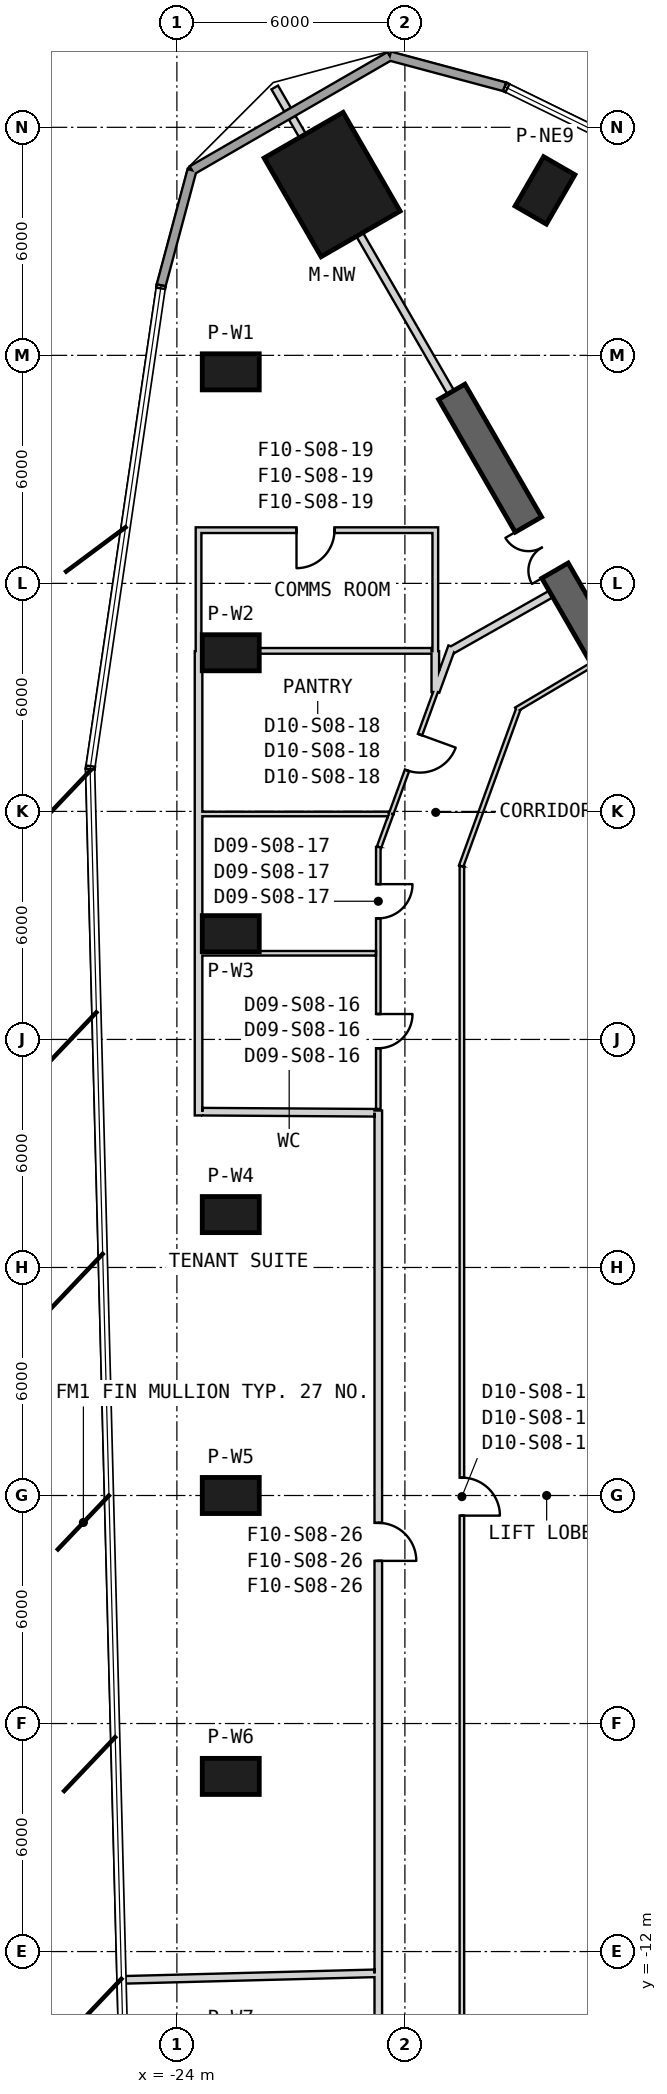
"""IFC4 building model, lengths in metres.
Left out: names, types, materials, properties, quantities, classifications, styles, units other than length and angle.
Written with IfcOpenShell. Run it as: python <this file> out.ifc"""

import sys

from ifc_helpers import new_model, si_unit, direction, frame, frame_2d, origin, origin_2d, place, context, subcontext, project, spatial, rectangle, extrude, element, fill, save


model = new_model("IFC4")
c1 = context("Model", 3, precision=1e-05, world=origin(), true_north=direction((0.0, 1.0)))
c2 = subcontext(c1, "Body", "Model", "MODEL_VIEW")
j1 = project(units=[si_unit("LENGTHUNIT", "METRE"), si_unit("PLANEANGLEUNIT", "RADIAN")], contexts=[c1])
p1 = place(None, origin())
s1 = spatial("IfcSite", under=j1, at=p1, CompositionType="ELEMENT")
p2 = place(p1, origin())
s2 = spatial("IfcBuilding", under=s1, at=p2, CompositionType="ELEMENT")
p3 = place(p2, frame((0.0, 0.0, 143.9)))
s3 = spatial("IfcBuildingStorey", under=s2, at=p3, CompositionType="ELEMENT", Elevation=143.9)
p4 = place(p3, frame((-19.915, 34.494, 0.0), z_axis=(0.0, 0.0, 1.0), x_axis=(-0.5, 0.866025403784, 0.0)))
e1 = element("IfcColumn", 1, at=p4, inside=s3, PredefinedType="COLUMN", context=c2, shape_type="SweptSolid", body=[
    extrude(rectangle(XDim=3.0, YDim=2.4, at=origin_2d()), origin(), (0.0, 0.0, 1.0), 4.1),
])
for number, where, z_axis, x_axis in (
    (2, (-22.583, 29.566, 0.0), (0.0, 0.0, 1.0), (-1.0, 0.0, 0.0)),
    (3, (-22.583, 22.174, 0.0), (0.0, 0.0, 1.0), (-1.0, 0.0, 0.0)),
    (4, (-22.583, 14.783, 0.0), (0.0, 0.0, 1.0), (-1.0, 0.0, 0.0)),
    (5, (-22.583, 7.391, 0.0), (0.0, 0.0, 1.0), (-1.0, 0.0, 0.0)),
    (6, (-22.583, 0.0, 0.0), (0.0, 0.0, 1.0), (-1.0, 0.0, 0.0)),
    (7, (-22.583, -7.391, 0.0), (0.0, 0.0, 1.0), (-1.0, 0.0, 0.0)),
    (8, (-14.313, 34.34, 0.0), (0.0, 0.0, 1.0), (0.5, 0.866, 0.0)),
):
    element("IfcColumn", number, at=place(p3, frame(where, z_axis=z_axis, x_axis=x_axis)), inside=s3, PredefinedType="COLUMN", context=c2, shape_type="SweptSolid", body=[
        extrude(rectangle(XDim=1.5, YDim=0.95, at=origin_2d()), origin(), (0.0, 0.0, 1.0), 4.1),
    ])
p5 = place(p3, frame((-10.575, 18.316, 0.0), z_axis=(0.0, 0.0, 1.0), x_axis=(-0.500002326941, 0.86602406032, 0.0)))
e9 = element("IfcWall", 9, at=p5, inside=s3, PredefinedType="SHEAR", context=c2, shape_type="SweptSolid", body=[
    extrude(rectangle(XDim=12.384, YDim=0.8, at=frame_2d((6.192, 0.0))), origin(), (0.0, 0.0, 1.0), 4.1),
])
p6 = place(p5, frame((6.95, 0.0, 0.0)))
e10 = element("IfcOpeningElement", 10, at=p6, cuts=e9, PredefinedType="OPENING", context=c2, shape_type="SweptSolid", body=[
    extrude(rectangle(XDim=1.4, YDim=2.4, at=frame_2d((0.7, 1.2))), frame((0.0, 0.41, 0.0), z_axis=(0.0, -1.0, 0.0), x_axis=(1.0, 0.0, 0.0)), (0.0, 0.0, 1.0), 0.82),
])
p7 = place(p3, frame((-15.373, 37.066, 0.0), z_axis=(0.0, 0.0, 1.0), x_axis=(-0.965928914048, 0.258807521156, 0.0)))
e11 = element("IfcWall", 11, at=p7, inside=s3, PredefinedType="SOLIDWALL", context=c2, shape_type="SweptSolid", body=[
    extrude(rectangle(XDim=3.132, YDim=0.24, at=frame_2d((1.566, 0.0))), origin(), (0.0, 0.0, 1.0), 3.8),
])
p8 = place(p3, frame((-18.398, 37.876, 0.0), z_axis=(0.0, 0.0, 1.0), x_axis=(-0.866037453254, -0.499979129126, 0.0)))
e12 = element("IfcWall", 12, at=p8, inside=s3, PredefinedType="SOLIDWALL", context=c2, shape_type="SweptSolid", body=[
    extrude(rectangle(XDim=6.01, YDim=0.24, at=frame_2d((3.005, 0.0))), origin(), (0.0, 0.0, 1.0), 3.8),
])
p9 = place(p3, frame((-23.603, 34.871, 0.0), z_axis=(0.0, 0.0, 1.0), x_axis=(-0.258820386593, -0.965925466837, 0.0)))
e13 = element("IfcWall", 13, at=p9, inside=s3, PredefinedType="SOLIDWALL", context=c2, shape_type="SweptSolid", body=[
    extrude(rectangle(XDim=3.136, YDim=0.24, at=frame_2d((1.568, 0.0))), origin(), (0.0, 0.0, 1.0), 3.8),
])
p10 = place(p3, frame((-13.082, 21.859, 0.0), z_axis=(0.0, 0.0, 1.0), x_axis=(-0.860286384661, -0.509811079095, 0.0)))
e14 = element("IfcWall", 14, at=p10, inside=s3, PredefinedType="PARTITIONING", context=c2, shape_type="SweptSolid", body=[
    extrude(rectangle(XDim=2.311, YDim=0.12, at=frame_2d((1.155, 0.0))), origin(), (0.0, 0.0, 1.0), 3.8),
])
p11 = place(p3, frame((-15.017, 20.692, 0.0), z_axis=(0.0, 0.0, 1.0), x_axis=(-0.342028368186, -0.939689627141, 0.0)))
e15 = element("IfcWall", 15, at=p11, inside=s3, PredefinedType="PARTITIONING", context=c2, shape_type="SweptSolid", body=[
    extrude(rectangle(XDim=4.397, YDim=0.12, at=frame_2d((2.198, 0.0))), origin(), (0.0, 0.0, 1.0), 2.88),
])
p12 = place(p3, frame((-16.5, 16.557, 0.0), z_axis=(0.0, 0.0, 1.0), x_axis=(0.0, -1.0, 0.0)))
e16 = element("IfcWall", 16, at=p12, inside=s3, PredefinedType="PARTITIONING", context=c2, shape_type="SweptSolid", body=[
    extrude(rectangle(XDim=33.234, YDim=0.12, at=frame_2d((16.617, 0.0))), origin(), (0.0, 0.0, 1.0), 2.98),
])
p13 = place(p12, frame((16.087, 0.0, 0.0)))
e17 = element("IfcOpeningElement", 17, at=p13, cuts=e16, PredefinedType="OPENING", context=c2, shape_type="SweptSolid", body=[
    extrude(rectangle(XDim=1.0, YDim=2.1, at=frame_2d((0.5, 1.05))), frame((0.0, 0.07, 0.0), z_axis=(0.0, -1.0, 0.0), x_axis=(1.0, 0.0, 0.0)), (0.0, 0.0, 1.0), 0.14),
])
p14 = place(p3, frame((-18.7, 10.13, 0.0), z_axis=(0.0, 0.0, 1.0), x_axis=(0.0, -1.0, 0.0)))
e18 = element("IfcWall", 18, at=p14, inside=s3, PredefinedType="PARTITIONING", context=c2, shape_type="SweptSolid", body=[
    extrude(rectangle(XDim=27.035, YDim=0.2, at=frame_2d((13.517, 0.0))), origin(), (0.0, 0.0, 1.0), 3.08),
])
p15 = place(p14, frame((10.85, 0.0, 0.0)))
e19 = element("IfcOpeningElement", 19, at=p15, cuts=e18, PredefinedType="OPENING", context=c2, shape_type="SweptSolid", body=[
    extrude(rectangle(XDim=1.0, YDim=2.1, at=frame_2d((0.5, 1.05))), frame((0.0, 0.11, 0.0), z_axis=(0.0, -1.0, 0.0), x_axis=(1.0, 0.0, 0.0)), (0.0, 0.0, 1.0), 0.22),
])
p16 = place(p3, frame((-16.76, 22.333, 0.0), z_axis=(0.0, 0.0, 1.0), x_axis=(-0.342041387985, -0.93968488809, 0.0)))
e20 = element("IfcWall", 20, at=p16, inside=s3, PredefinedType="PARTITIONING", context=c2, shape_type="SweptSolid", body=[
    extrude(rectangle(XDim=1.248, YDim=0.2, at=frame_2d((0.624, 0.0))), origin(), (0.0, 0.0, 1.0), 2.88),
])
p17 = place(p3, frame((-14.156, 23.719, 0.0), z_axis=(0.0, 0.0, 1.0), x_axis=(-0.870320915518, -0.492485029226, 0.0)))
e21 = element("IfcWall", 21, at=p17, inside=s3, PredefinedType="PARTITIONING", context=c2, shape_type="SweptSolid", body=[
    extrude(rectangle(XDim=2.99, YDim=0.2, at=frame_2d((1.495, 0.0))), origin(), (0.0, 0.0, 1.0), 2.88),
])
p18 = place(p3, frame((-18.7, 17.065, 0.0), z_axis=(0.0, 0.0, 1.0), x_axis=(0.0, -1.0, 0.0)))
e22 = element("IfcWall", 22, at=p18, inside=s3, PredefinedType="PARTITIONING", context=c2, shape_type="SweptSolid", body=[
    extrude(rectangle(XDim=6.895, YDim=0.12, at=frame_2d((3.447, 0.0))), origin(), (0.0, 0.0, 1.0), 3.08),
])
p19 = place(p18, frame((4.396, 0.0, 0.0)))
e23 = element("IfcOpeningElement", 23, at=p19, cuts=e22, PredefinedType="OPENING", context=c2, shape_type="SweptSolid", body=[
    extrude(rectangle(XDim=0.9, YDim=2.1, at=frame_2d((0.45, 1.05))), frame((0.0, 0.07, 0.0), z_axis=(0.0, -1.0, 0.0), x_axis=(1.0, 0.0, 0.0)), (0.0, 0.0, 1.0), 0.14),
])
p20 = place(p18, frame((0.979, 0.0, 0.0)))
e24 = element("IfcOpeningElement", 24, at=p20, cuts=e22, PredefinedType="OPENING", context=c2, shape_type="SweptSolid", body=[
    extrude(rectangle(XDim=0.9, YDim=2.1, at=frame_2d((0.45, 1.05))), frame((0.0, 0.07, 0.0), z_axis=(0.0, -1.0, 0.0), x_axis=(1.0, 0.0, 0.0)), (0.0, 0.0, 1.0), 0.14),
])
p21 = place(p3, frame((-17.188, 21.16, 0.0), z_axis=(0.0, 0.0, 1.0), x_axis=(-0.342046352126, -0.939683081149, 0.0)))
e25 = element("IfcWall", 25, at=p21, inside=s3, PredefinedType="PARTITIONING", context=c2, shape_type="SweptSolid", body=[
    extrude(rectangle(XDim=3.425, YDim=0.12, at=frame_2d((1.713, 0.0))), origin(), (0.0, 0.0, 1.0), 2.98),
])
p22 = place(p21, frame((1.213, 0.0, 0.0)))
e26 = element("IfcOpeningElement", 26, at=p22, cuts=e25, PredefinedType="OPENING", context=c2, shape_type="SweptSolid", body=[
    extrude(rectangle(XDim=1.0, YDim=2.1, at=frame_2d((0.5, 1.05))), frame((0.0, 0.07, 0.0), z_axis=(0.0, -1.0, 0.0), x_axis=(1.0, 0.0, 0.0)), (0.0, 0.0, 1.0), 0.14),
])
p23 = place(p3, frame((-18.359, 17.941, 0.0), z_axis=(0.0, 0.0, 1.0), x_axis=(-0.341910451958, -0.939732537929, 0.0)))
e27 = element("IfcWall", 27, at=p23, inside=s3, PredefinedType="PARTITIONING", context=c2, shape_type="SweptSolid", body=[
    extrude(rectangle(XDim=0.937, YDim=0.12, at=frame_2d((0.468, 0.0))), origin(), (0.0, 0.0, 1.0), 2.98),
])
p24 = place(p3, frame((-25.457, -12.746, 0.0), z_axis=(0.0, 0.0, 1.0), x_axis=(0.999663993994, 0.025921016788, 0.0)))
e28 = element("IfcWall", 28, at=p24, inside=s3, PredefinedType="PARTITIONING", context=c2, shape_type="SweptSolid", body=[
    extrude(rectangle(XDim=6.659, YDim=0.2, at=frame_2d((3.33, 0.0))), origin(), (0.0, 0.0, 1.0), 3.08),
])
p25 = place(p3, frame((-21.425, 37.049, 0.0), z_axis=(0.0, 0.0, 1.0), x_axis=(0.499784885981, -0.866149564305, 0.0)))
e29 = element("IfcWall", 29, at=p25, inside=s3, PredefinedType="PARTITIONING", context=c2, shape_type="SweptSolid", body=[
    extrude(rectangle(XDim=0.677, YDim=0.2, at=frame_2d((0.338, 0.0))), origin(), (0.0, 0.0, 1.0), 3.8),
])
p26 = place(p3, frame((-20.966, 36.255, 0.0), z_axis=(0.0, 0.0, 1.0), x_axis=(0.500004084281, -0.866023045711, 0.0)))
e30 = element("IfcWall", 30, at=p26, inside=s3, PredefinedType="PARTITIONING", context=c2, shape_type="SweptSolid", body=[
    extrude(rectangle(XDim=0.55, YDim=0.2, at=frame_2d((0.275, 0.0))), origin(), (0.0, 0.0, 1.0), 3.8),
])
p27 = place(p3, frame((-19.191, 33.18, 0.0), z_axis=(0.0, 0.0, 1.0), x_axis=(0.500036743394, -0.866004188936, 0.0)))
e31 = element("IfcWall", 31, at=p27, inside=s3, PredefinedType="PARTITIONING", context=c2, shape_type="SweptSolid", body=[
    extrude(rectangle(XDim=4.797, YDim=0.2, at=frame_2d((2.398, 0.0))), origin(), (0.0, 0.0, 1.0), 3.37),
])
p28 = place(p3, frame((-23.43, 10.0, 0.0), z_axis=(0.0, 0.0, 1.0), x_axis=(0.0, 1.0, 0.0)))
e32 = element("IfcWall", 32, at=p28, inside=s3, PredefinedType="PARTITIONING", context=c2, shape_type="SweptSolid", body=[
    extrude(rectangle(XDim=7.932, YDim=0.2, at=frame_2d((3.966, 0.0))), origin(), (0.0, 0.0, 1.0), 3.8),
])
p29 = place(p3, frame((-23.43, 17.932, 0.0), z_axis=(0.0, 0.0, 1.0), x_axis=(0.0, 1.0, 0.0)))
e33 = element("IfcWall", 33, at=p29, inside=s3, PredefinedType="PARTITIONING", context=c2, shape_type="SweptSolid", body=[
    extrude(rectangle(XDim=4.285, YDim=0.2, at=frame_2d((2.142, 0.0))), origin(), (0.0, 0.0, 1.0), 3.8),
])
p30 = place(p3, frame((-23.33, 10.099, 0.0), z_axis=(0.0, 0.0, 1.0), x_axis=(0.999979779172, -0.006359343247, 0.0)))
e34 = element("IfcWall", 34, at=p30, inside=s3, PredefinedType="PARTITIONING", context=c2, shape_type="SweptSolid", body=[
    extrude(rectangle(XDim=4.53, YDim=0.2, at=frame_2d((2.265, 0.0))), origin(), (0.0, 0.0, 1.0), 3.8),
])
p31 = place(p3, frame((-17.2, 21.141, 0.0), z_axis=(0.0, 0.0, 1.0), x_axis=(0.0, 1.0, 0.0)))
e35 = element("IfcWall", 35, at=p31, inside=s3, PredefinedType="PARTITIONING", context=c2, shape_type="SweptSolid", body=[
    extrude(rectangle(XDim=1.075, YDim=0.2, at=frame_2d((0.538, 0.0))), origin(), (0.0, 0.0, 1.0), 2.88),
])
p32 = place(p3, frame((-17.2, 22.217, 0.0), z_axis=(0.0, 0.0, 1.0), x_axis=(0.0, 1.0, 0.0)))
e36 = element("IfcWall", 36, at=p32, inside=s3, PredefinedType="PLUMBINGWALL", context=c2, shape_type="SweptSolid", body=[
    extrude(rectangle(XDim=3.259, YDim=0.15, at=frame_2d((1.629, 0.0))), origin(), (0.0, 0.0, 1.0), 2.88),
])
p33 = place(p3, frame((-17.275, 25.4, 0.0), z_axis=(0.0, 0.0, 1.0), x_axis=(-1.0, 0.0, 0.0)))
e37 = element("IfcWall", 37, at=p33, inside=s3, PredefinedType="PLUMBINGWALL", context=c2, shape_type="SweptSolid", body=[
    extrude(rectangle(XDim=6.23, YDim=0.15, at=frame_2d((3.115, 0.0))), origin(), (0.0, 0.0, 1.0), 2.88),
])
p34 = place(p33, frame((2.577, 0.0, 0.0)))
e38 = element("IfcOpeningElement", 38, at=p34, cuts=e37, PredefinedType="OPENING", context=c2, shape_type="SweptSolid", body=[
    extrude(rectangle(XDim=1.0, YDim=2.1, at=frame_2d((0.5, 1.05))), frame((0.0, 0.085, 0.0), z_axis=(0.0, -1.0, 0.0), x_axis=(1.0, 0.0, 0.0)), (0.0, 0.0, 1.0), 0.17),
])
p35 = place(p3, frame((-23.43, 22.217, 0.0), z_axis=(0.0, 0.0, 1.0), x_axis=(0.0, 1.0, 0.0)))
e39 = element("IfcWall", 39, at=p35, inside=s3, PredefinedType="PLUMBINGWALL", context=c2, shape_type="SweptSolid", body=[
    extrude(rectangle(XDim=3.108, YDim=0.15, at=frame_2d((1.554, 0.0))), origin(), (0.0, 0.0, 1.0), 3.8),
])
p36 = place(p3, frame((-18.76, 14.267, 0.0), z_axis=(0.0, 0.0, 1.0), x_axis=(-1.0, 0.0, 0.0)))
e40 = element("IfcWall", 40, at=p36, inside=s3, PredefinedType="PARTITIONING", context=c2, shape_type="SweptSolid", body=[
    extrude(rectangle(XDim=4.57, YDim=0.12, at=frame_2d((2.285, 0.0))), origin(), (0.0, 0.0, 1.0), 3.08),
])
p37 = place(p3, frame((-23.33, 17.932, 0.0), z_axis=(0.0, 0.0, 1.0), x_axis=(1.0, 0.0, 0.0)))
e41 = element("IfcWall", 41, at=p37, inside=s3, PredefinedType="PARTITIONING", context=c2, shape_type="SweptSolid", body=[
    extrude(rectangle(XDim=4.904, YDim=0.12, at=frame_2d((2.452, 0.0))), origin(), (0.0, 0.0, 1.0), 2.98),
])
p38 = place(p3, frame((-17.3, 22.224, 0.0), z_axis=(0.0, 0.0, 1.0), x_axis=(-1.0, 0.0, 0.0)))
e42 = element("IfcWall", 42, at=p38, inside=s3, PredefinedType="PLUMBINGWALL", context=c2, shape_type="SweptSolid", body=[
    extrude(rectangle(XDim=6.03, YDim=0.15, at=frame_2d((3.015, 0.0))), origin(), (0.0, 0.0, 1.0), 3.8),
])
p39 = place(p13, origin())
e43 = element("IfcDoor", 43, at=p39, inside=s3, OperationType="SINGLE_SWING_RIGHT", PredefinedType="NOTDEFINED", context=c2, shape_type="SweptSolid", body=[
    extrude(rectangle(XDim=1.0, YDim=2.1, at=frame_2d((0.5, 1.05))), frame((0.0, 0.025, 0.0), z_axis=(0.0, -1.0, 0.0), x_axis=(1.0, 0.0, 0.0)), (0.0, 0.0, 1.0), 0.05),
])
fill(e17, e43)
p40 = place(p19, origin())
e44 = element("IfcDoor", 44, at=p40, inside=s3, OperationType="SINGLE_SWING_LEFT", PredefinedType="NOTDEFINED", context=c2, shape_type="SweptSolid", body=[
    extrude(rectangle(XDim=0.9, YDim=2.1, at=frame_2d((0.45, 1.05))), frame((0.0, 0.025, 0.0), z_axis=(0.0, -1.0, 0.0), x_axis=(1.0, 0.0, 0.0)), (0.0, 0.0, 1.0), 0.05),
])
fill(e23, e44)
p41 = place(p20, origin())
e45 = element("IfcDoor", 45, at=p41, inside=s3, OperationType="SINGLE_SWING_LEFT", PredefinedType="NOTDEFINED", context=c2, shape_type="SweptSolid", body=[
    extrude(rectangle(XDim=0.9, YDim=2.1, at=frame_2d((0.45, 1.05))), frame((0.0, 0.025, 0.0), z_axis=(0.0, -1.0, 0.0), x_axis=(1.0, 0.0, 0.0)), (0.0, 0.0, 1.0), 0.05),
])
fill(e24, e45)
p42 = place(p22, origin())
e46 = element("IfcDoor", 46, at=p42, inside=s3, OperationType="SINGLE_SWING_RIGHT", PredefinedType="NOTDEFINED", context=c2, shape_type="SweptSolid", body=[
    extrude(rectangle(XDim=1.0, YDim=2.1, at=frame_2d((0.5, 1.05))), frame((0.0, 0.025, 0.0), z_axis=(0.0, -1.0, 0.0), x_axis=(1.0, 0.0, 0.0)), (0.0, 0.0, 1.0), 0.05),
])
fill(e26, e46)
p43 = place(p34, origin())
e47 = element("IfcDoor", 47, at=p43, inside=s3, OperationType="SINGLE_SWING_LEFT", PredefinedType="USERDEFINED", context=c2, shape_type="SweptSolid", body=[
    extrude(rectangle(XDim=1.0, YDim=2.1, at=frame_2d((0.5, 1.05))), frame((0.0, 0.025, 0.0), z_axis=(0.0, -1.0, 0.0), x_axis=(1.0, 0.0, 0.0)), (0.0, 0.0, 1.0), 0.05),
])
fill(e38, e47)
p44 = place(p15, origin())
e48 = element("IfcDoor", 48, at=p44, inside=s3, OperationType="SINGLE_SWING_LEFT", PredefinedType="USERDEFINED", context=c2, shape_type="SweptSolid", body=[
    extrude(rectangle(XDim=1.0, YDim=2.1, at=frame_2d((0.5, 1.05))), frame((0.0, 0.025, 0.0), z_axis=(0.0, -1.0, 0.0), x_axis=(1.0, 0.0, 0.0)), (0.0, 0.0, 1.0), 0.05),
])
fill(e19, e48)
p45 = place(p6, origin())
e49 = element("IfcDoor", 49, at=p45, inside=s3, OperationType="DOUBLE_DOOR_SINGLE_SWING", PredefinedType="NOTDEFINED", context=c2, shape_type="SweptSolid", body=[
    extrude(rectangle(XDim=1.4, YDim=2.4, at=frame_2d((0.7, 1.2))), frame((0.0, 0.025, 0.0), z_axis=(0.0, -1.0, 0.0), x_axis=(1.0, 0.0, 0.0)), (0.0, 0.0, 1.0), 0.05),
])
fill(e10, e49)
save(model, sys.argv[1])
